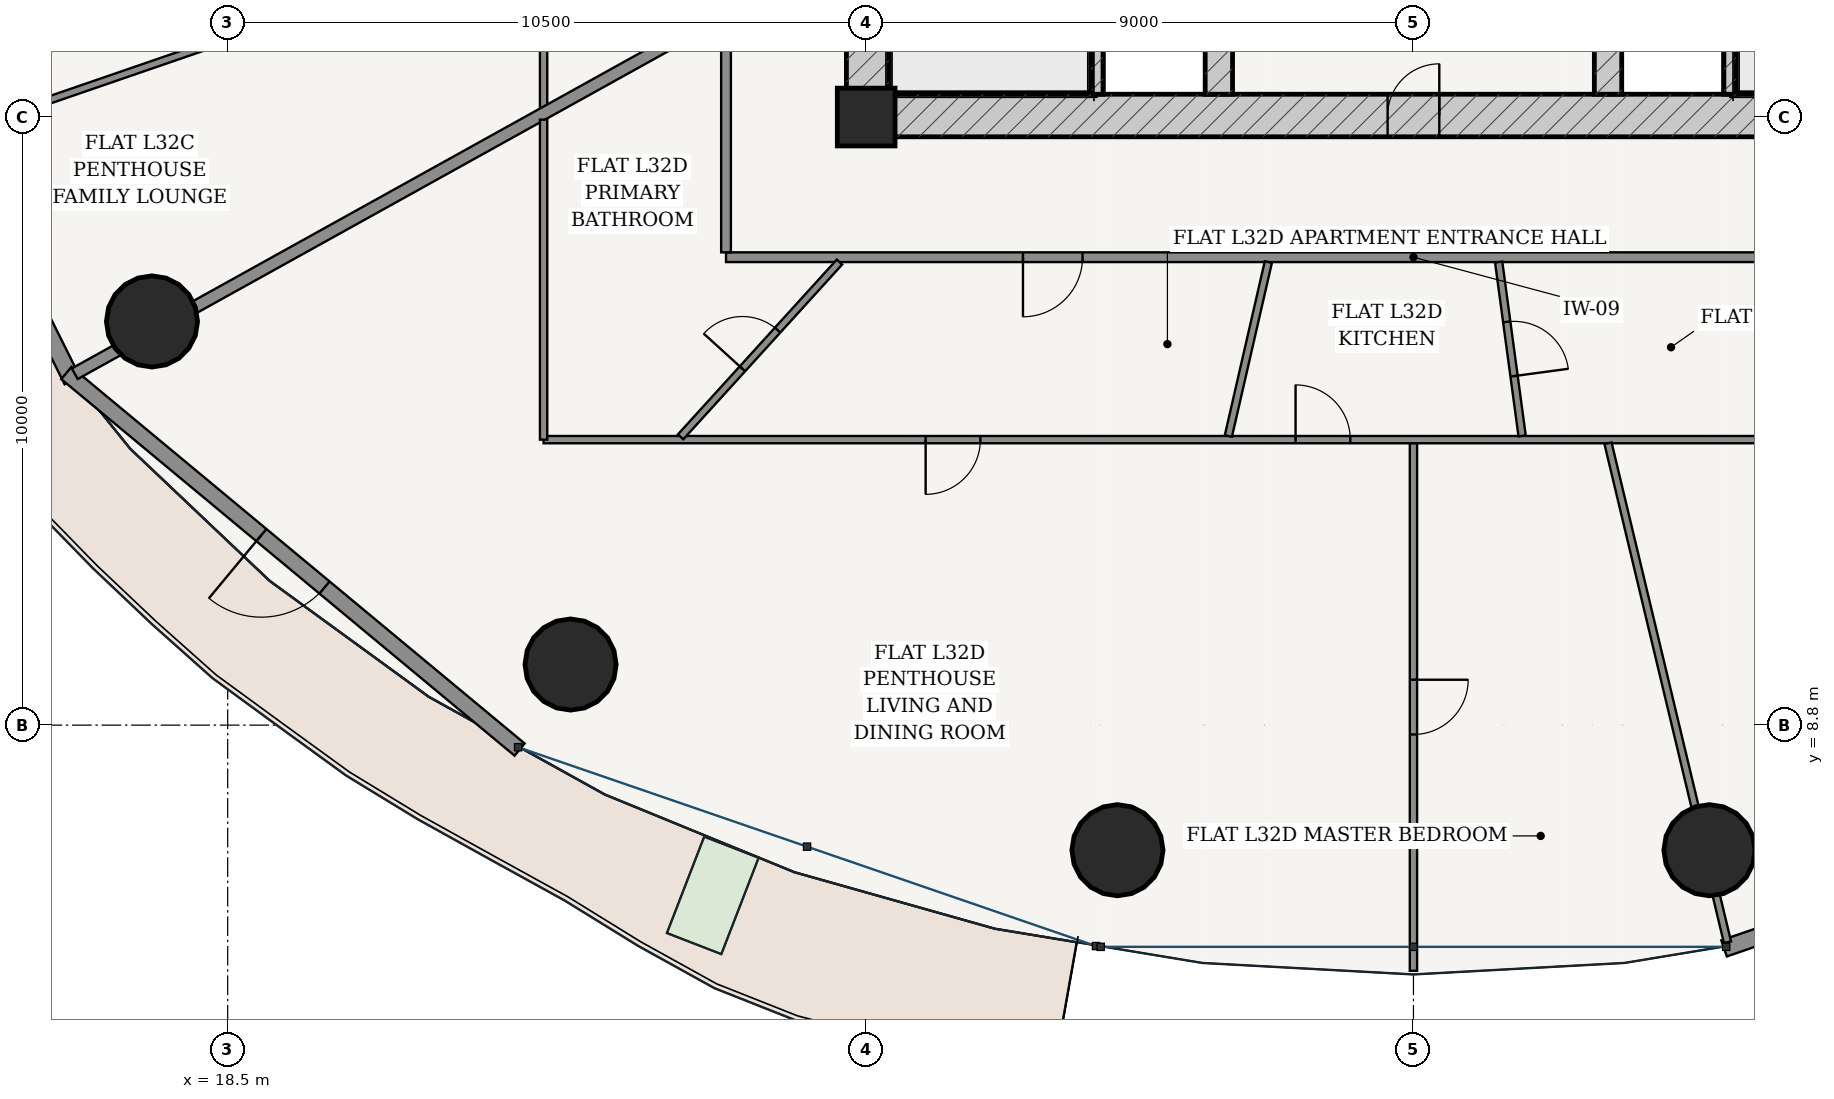
"""IFC4 building model, lengths in metres.
Left out: names, types, materials, properties, quantities, classifications, styles, units other than length and angle.
Written with IfcOpenShell. Run it as: python <this file> out.ifc"""

import sys

from ifc_helpers import new_model, si_unit, direction, frame, frame_2d, origin, origin_2d, place, context, subcontext, project, spatial, rectangle, hollow_circle, extrude, source, transform, mapped, element, fill, save


model = new_model("IFC4")
c1 = context("Model", 3, precision=1e-05, world=origin(), true_north=direction((-0.2419218956, 0.970295726276)))
c2 = subcontext(c1, "Body", "Model", "MODEL_VIEW")
j1 = project(units=[si_unit("LENGTHUNIT", "METRE"), si_unit("PLANEANGLEUNIT", "RADIAN")], contexts=[c1])
p1 = place(None, origin())
s1 = spatial("IfcSite", under=j1, at=p1, CompositionType="ELEMENT")
p2 = place(p1, origin())
s2 = spatial("IfcBuilding", under=s1, at=p2, CompositionType="ELEMENT")
p3 = place(p2, frame((0.0, 0.0, 123.0)))
s3 = spatial("IfcBuildingStorey", under=s2, at=p3, CompositionType="ELEMENT", Elevation=123.0)
p4 = place(p3, frame((29.0, 18.8, 0.0), z_axis=(0.0, 0.0, 1.0), x_axis=(1.0, 0.0, 0.0)))
e1 = element("IfcColumn", 1, at=p4, inside=s3, PredefinedType="COLUMN", context=c2, shape_type="SweptSolid", body=[
    extrude(rectangle(XDim=0.95, YDim=0.95, at=origin_2d()), origin(), (0.0, 0.0, 1.0), 3.6),
])
p5 = place(p3, frame((28.675, 18.825, 0.0), z_axis=(0.0, 0.0, 1.0), x_axis=(1.0, 0.0, 0.0)))
e2 = element("IfcWall", 2, at=p5, inside=s3, PredefinedType="SHEAR", context=c2, shape_type="SweptSolid", body=[
    extrude(rectangle(XDim=18.65, YDim=0.7, at=frame_2d((9.325, 0.0))), origin(), (0.0, 0.0, 1.0), 3.325),
])
p6 = place(p5, frame((8.9, 0.0, 0.0)))
e3 = element("IfcOpeningElement", 3, at=p6, cuts=e2, PredefinedType="OPENING", context=c2, shape_type="SweptSolid", body=[
    extrude(rectangle(XDim=0.85, YDim=2.1, at=frame_2d((0.425, 1.05))), frame((0.0, 0.36, 0.0), z_axis=(0.0, -1.0, 0.0), x_axis=(1.0, 0.0, 0.0)), (0.0, 0.0, 1.0), 0.72),
])
p7 = place(p3, frame((29.025, 19.175, 0.0), z_axis=(0.0, 0.0, 1.0), x_axis=(0.0, 1.0, 0.0)))
e4 = element("IfcWall", 4, at=p7, inside=s3, PredefinedType="SHEAR", context=c2, shape_type="SweptSolid", body=[
    extrude(rectangle(XDim=15.25, YDim=0.7, at=frame_2d((7.625, 0.0))), origin(), (0.0, 0.0, 1.0), 3.325),
])
p8 = place(p7, frame((9.875, 0.0, 0.0)))
e5 = element("IfcOpeningElement", 5, at=p8, cuts=e4, PredefinedType="OPENING", context=c2, shape_type="SweptSolid", body=[
    extrude(rectangle(XDim=1.5, YDim=2.2, at=frame_2d((0.75, 1.1))), frame((0.0, 0.36, 0.0), z_axis=(0.0, -1.0, 0.0), x_axis=(1.0, 0.0, 0.0)), (0.0, 0.0, 1.0), 0.72),
])
for number, where, z_axis, x_axis in (
    (6, (32.795, 19.175, 0.0), (0.0, 0.0, 1.0), (0.0, 1.0, 0.0)),
    (7, (43.205, 19.175, 0.0), (0.0, 0.0, 1.0), (0.0, 1.0, 0.0)),
):
    element("IfcWall", number, at=place(p3, frame(where, z_axis=z_axis, x_axis=x_axis)), inside=s3, PredefinedType="SOLIDWALL", context=c2, shape_type="SweptSolid", body=[
        extrude(rectangle(XDim=7.375, YDim=0.2, at=frame_2d((3.688, 0.0))), origin(), (0.0, 0.0, 1.0), 3.325),
    ])
p9 = place(p3, frame((34.8, 19.175, 0.0), z_axis=(0.0, 0.0, 1.0), x_axis=(0.0, 1.0, 0.0)))
e8 = element("IfcWall", 8, at=p9, inside=s3, PredefinedType="SHEAR", context=c2, shape_type="SweptSolid", body=[
    extrude(rectangle(XDim=15.25, YDim=0.45, at=frame_2d((7.625, 0.0))), origin(), (0.0, 0.0, 1.0), 3.325),
])
p10 = place(p9, frame((7.8, 0.0, 0.0)))
e9 = element("IfcOpeningElement", 9, at=p10, cuts=e8, PredefinedType="OPENING", context=c2, shape_type="SweptSolid", body=[
    extrude(rectangle(XDim=1.05, YDim=2.15, at=frame_2d((0.525, 1.075))), frame((0.0, 0.235, 0.0), z_axis=(0.0, -1.0, 0.0), x_axis=(1.0, 0.0, 0.0)), (0.0, 0.0, 1.0), 0.47),
])
p11 = place(p3, frame((41.2, 19.175, 0.0), z_axis=(0.0, 0.0, 1.0), x_axis=(0.0, 1.0, 0.0)))
e10 = element("IfcWall", 10, at=p11, inside=s3, PredefinedType="SHEAR", context=c2, shape_type="SweptSolid", body=[
    extrude(rectangle(XDim=15.25, YDim=0.45, at=frame_2d((7.625, 0.0))), origin(), (0.0, 0.0, 1.0), 3.325),
])
p12 = place(p11, frame((7.8, 0.0, 0.0)))
e11 = element("IfcOpeningElement", 11, at=p12, cuts=e10, PredefinedType="OPENING", context=c2, shape_type="SweptSolid", body=[
    extrude(rectangle(XDim=1.05, YDim=2.15, at=frame_2d((0.525, 1.075))), frame((0.0, 0.235, 0.0), z_axis=(0.0, -1.0, 0.0), x_axis=(1.0, 0.0, 0.0)), (0.0, 0.0, 1.0), 0.47),
])
for number, where, z_axis, x_axis in (
    (12, (17.255, 15.438, 0.0), (0.0, 0.0, 1.0), (1.0, 0.0, 0.0)),
    (13, (24.138, 9.796, 0.0), (0.0, 0.0, 1.0), (1.0, 0.0, 0.0)),
    (14, (33.133, 6.743, 0.0), (0.0, 0.0, 1.0), (1.0, 0.0, 0.0)),
    (15, (42.867, 6.743, 0.0), (0.0, 0.0, 1.0), (1.0, 0.0, 0.0)),
):
    element("IfcColumn", number, at=place(p3, frame(where, z_axis=z_axis, x_axis=x_axis)), inside=s3, PredefinedType="COLUMN", context=c2, shape_type="SweptSolid", body=[
        extrude(hollow_circle(Radius=0.75, WallThickness=0.045, at=origin_2d()), origin(), (0.0, 0.0, 1.0), 3.6),
    ])
p13 = place(p3, frame((11.905, 22.566, 0.0), z_axis=(0.0, 0.0, 1.0), x_axis=(0.446274562077, -0.894896091869, 0.0)))
e16 = element("IfcWall", 16, at=p13, inside=s3, PredefinedType="SOLIDWALL", context=c2, shape_type="SweptSolid", body=[
    extrude(rectangle(XDim=9.05, YDim=0.28, at=frame_2d((4.525, 0.0))), origin(), (0.0, 0.0, 1.0), 3.325),
])
p14 = place(p13, frame((1.394, 0.0, 0.85)))
e17 = element("IfcOpeningElement", 17, at=p14, cuts=e16, PredefinedType="OPENING", context=c2, shape_type="SweptSolid", body=[
    extrude(rectangle(XDim=2.1, YDim=1.95, at=frame_2d((1.05, 0.975))), frame((0.0, 0.15, 0.0), z_axis=(0.0, -1.0, 0.0), x_axis=(1.0, 0.0, 0.0)), (0.0, 0.0, 1.0), 0.3),
])
p15 = place(p13, frame((5.557, 0.0, 0.85)))
e18 = element("IfcOpeningElement", 18, at=p15, cuts=e16, PredefinedType="OPENING", context=c2, shape_type="SweptSolid", body=[
    extrude(rectangle(XDim=2.1, YDim=1.95, at=frame_2d((1.05, 0.975))), frame((0.0, 0.15, 0.0), z_axis=(0.0, -1.0, 0.0), x_axis=(1.0, 0.0, 0.0)), (0.0, 0.0, 1.0), 0.3),
])
p16 = place(p3, frame((15.846, 14.59, 0.0), z_axis=(0.0, 0.0, 1.0), x_axis=(0.769254958887, -0.638941944333, 0.0)))
e19 = element("IfcWall", 19, at=p16, inside=s3, PredefinedType="SOLIDWALL", context=c2, shape_type="SweptSolid", body=[
    extrude(rectangle(XDim=9.69, YDim=0.26, at=frame_2d((4.845, 0.0))), origin(), (0.0, 0.0, 1.0), 3.325),
])
p17 = place(p16, frame((4.17, 0.0, 0.0)))
e20 = element("IfcOpeningElement", 20, at=p17, cuts=e19, PredefinedType="OPENING", context=c2, shape_type="SweptSolid", body=[
    extrude(rectangle(XDim=1.35, YDim=2.2, at=frame_2d((0.675, 1.1))), frame((0.0, 0.14, 0.0), z_axis=(0.0, -1.0, 0.0), x_axis=(1.0, 0.0, 0.0)), (0.0, 0.0, 1.0), 0.28),
])
p18 = place(p3, frame((43.108, 5.128, 0.0), z_axis=(0.0, 0.0, 1.0), x_axis=(0.945590132341, 0.325360264351, 0.0)))
e21 = element("IfcWall", 21, at=p18, inside=s3, PredefinedType="SOLIDWALL", context=c2, shape_type="SweptSolid", body=[
    extrude(rectangle(XDim=10.289, YDim=0.28, at=frame_2d((5.145, 0.0))), origin(), (0.0, 0.0, 1.0), 3.325),
])
p19 = place(p18, frame((1.728, 0.0, 0.85)))
e22 = element("IfcOpeningElement", 22, at=p19, cuts=e21, PredefinedType="OPENING", context=c2, shape_type="SweptSolid", body=[
    extrude(rectangle(XDim=2.1, YDim=1.95, at=frame_2d((1.05, 0.975))), frame((0.0, 0.15, 0.0), z_axis=(0.0, -1.0, 0.0), x_axis=(1.0, 0.0, 0.0)), (0.0, 0.0, 1.0), 0.3),
])
p20 = place(p18, frame((6.461, 0.0, 0.85)))
e23 = element("IfcOpeningElement", 23, at=p20, cuts=e21, PredefinedType="OPENING", context=c2, shape_type="SweptSolid", body=[
    extrude(rectangle(XDim=2.1, YDim=1.95, at=frame_2d((1.05, 0.975))), frame((0.0, 0.15, 0.0), z_axis=(0.0, -1.0, 0.0), x_axis=(1.0, 0.0, 0.0)), (0.0, 0.0, 1.0), 0.3),
])
p21 = place(p3, frame((26.695, 16.495, 0.0), z_axis=(0.0, 0.0, 1.0), x_axis=(1.0, 0.0, 0.0)))
e24 = element("IfcWall", 24, at=p21, inside=s3, PredefinedType="PARTITIONING", context=c2, shape_type="SweptSolid", body=[
    extrude(rectangle(XDim=22.61, YDim=0.16, at=frame_2d((11.305, 0.0))), origin(), (0.0, 0.0, 1.0), 2.767),
])
p22 = place(p21, frame((4.883, 0.0, 0.0)))
e25 = element("IfcOpeningElement", 25, at=p22, cuts=e24, PredefinedType="OPENING", context=c2, shape_type="SweptSolid", body=[
    extrude(rectangle(XDim=0.98, YDim=2.2, at=frame_2d((0.49, 1.1))), frame((0.0, 0.09, 0.0), z_axis=(0.0, -1.0, 0.0), x_axis=(1.0, 0.0, 0.0)), (0.0, 0.0, 1.0), 0.18),
])
p23 = place(p3, frame((26.695, 16.575, 0.0), z_axis=(0.0, 0.0, 1.0), x_axis=(0.0, 1.0, 0.0)))
e26 = element("IfcWall", 26, at=p23, inside=s3, PredefinedType="PARTITIONING", context=c2, shape_type="SweptSolid", body=[
    extrude(rectangle(XDim=20.45, YDim=0.16, at=frame_2d((10.225, 0.0))), origin(), (0.0, 0.0, 1.0), 2.767),
])
p24 = place(p23, frame((9.547, 0.0, 0.0)))
e27 = element("IfcOpeningElement", 27, at=p24, cuts=e26, PredefinedType="OPENING", context=c2, shape_type="SweptSolid", body=[
    extrude(rectangle(XDim=0.98, YDim=2.2, at=frame_2d((0.49, 1.1))), frame((0.0, 0.09, 0.0), z_axis=(0.0, -1.0, 0.0), x_axis=(1.0, 0.0, 0.0)), (0.0, 0.0, 1.0), 0.18),
])
p25 = place(p3, frame((23.695, 18.961, 0.0), z_axis=(0.0, 0.0, 1.0), x_axis=(0.0, 1.0, 0.0)))
e28 = element("IfcWall", 28, at=p25, inside=s3, PredefinedType="PARTITIONING", context=c2, shape_type="SweptSolid", body=[
    extrude(rectangle(XDim=15.679, YDim=0.12, at=frame_2d((7.839, 0.0))), origin(), (0.0, 0.0, 1.0), 2.767),
])
p26 = place(p25, frame((7.625, 0.0, 0.0)))
e29 = element("IfcOpeningElement", 29, at=p26, cuts=e28, PredefinedType="OPENING", context=c2, shape_type="SweptSolid", body=[
    extrude(rectangle(XDim=0.9, YDim=2.15, at=frame_2d((0.45, 1.075))), frame((0.0, 0.07, 0.0), z_axis=(0.0, -1.0, 0.0), x_axis=(1.0, 0.0, 0.0)), (0.0, 0.0, 1.0), 0.14),
])
p27 = place(p25, frame((1.128, 0.0, 0.0)))
e30 = element("IfcOpeningElement", 30, at=p27, cuts=e28, PredefinedType="OPENING", context=c2, shape_type="SweptSolid", body=[
    extrude(rectangle(XDim=0.9, YDim=2.15, at=frame_2d((0.45, 1.075))), frame((0.0, 0.07, 0.0), z_axis=(0.0, -1.0, 0.0), x_axis=(1.0, 0.0, 0.0)), (0.0, 0.0, 1.0), 0.14),
])
p28 = place(p3, frame((23.636, 21.857, 0.0), z_axis=(0.0, 0.0, 1.0), x_axis=(-0.945571197348, -0.325415289661, 0.0)))
e31 = element("IfcWall", 31, at=p28, inside=s3, PredefinedType="PARTITIONING", context=c2, shape_type="SweptSolid", body=[
    extrude(rectangle(XDim=10.737, YDim=0.12, at=frame_2d((5.368, 0.0))), origin(), (0.0, 0.0, 1.0), 2.767),
])
p29 = place(p28, frame((4.918, 0.0, 0.0)))
e32 = element("IfcOpeningElement", 32, at=p29, cuts=e31, PredefinedType="OPENING", context=c2, shape_type="SweptSolid", body=[
    extrude(rectangle(XDim=0.9, YDim=2.15, at=frame_2d((0.45, 1.075))), frame((0.0, 0.07, 0.0), z_axis=(0.0, -1.0, 0.0), x_axis=(1.0, 0.0, 0.0)), (0.0, 0.0, 1.0), 0.14),
])
p30 = place(p3, frame((26.615, 20.48, 0.0), z_axis=(0.0, 0.0, 1.0), x_axis=(-0.874310671773, -0.48536671623, 0.0)))
e33 = element("IfcWall", 33, at=p30, inside=s3, PredefinedType="PARTITIONING", context=c2, shape_type="SweptSolid", body=[
    extrude(rectangle(XDim=12.159, YDim=0.2, at=frame_2d((6.079, 0.0))), origin(), (0.0, 0.0, 1.0), 2.767),
])
p31 = place(p3, frame((48.598, 13.495, 0.0), z_axis=(0.0, 0.0, 1.0), x_axis=(-1.0, 0.0, 0.0)))
e34 = element("IfcWall", 34, at=p31, inside=s3, PredefinedType="PARTITIONING", context=c2, shape_type="SweptSolid", body=[
    extrude(rectangle(XDim=24.903, YDim=0.12, at=frame_2d((12.452, 0.0))), origin(), (0.0, 0.0, 1.0), 2.767),
])
p32 = place(p31, frame((17.72, 0.0, 0.0)))
e35 = element("IfcOpeningElement", 35, at=p32, cuts=e34, PredefinedType="OPENING", context=c2, shape_type="SweptSolid", body=[
    extrude(rectangle(XDim=0.9, YDim=2.15, at=frame_2d((0.45, 1.075))), frame((0.0, 0.07, 0.0), z_axis=(0.0, -1.0, 0.0), x_axis=(1.0, 0.0, 0.0)), (0.0, 0.0, 1.0), 0.14),
])
p33 = place(p31, frame((11.637, 0.0, 0.0)))
e36 = element("IfcOpeningElement", 36, at=p33, cuts=e34, PredefinedType="OPENING", context=c2, shape_type="SweptSolid", body=[
    extrude(rectangle(XDim=0.9, YDim=2.15, at=frame_2d((0.45, 1.075))), frame((0.0, 0.07, 0.0), z_axis=(0.0, -1.0, 0.0), x_axis=(1.0, 0.0, 0.0)), (0.0, 0.0, 1.0), 0.14),
])
p34 = place(p31, frame((3.376, 0.0, 0.0)))
e37 = element("IfcOpeningElement", 37, at=p34, cuts=e34, PredefinedType="OPENING", context=c2, shape_type="SweptSolid", body=[
    extrude(rectangle(XDim=0.9, YDim=2.15, at=frame_2d((0.45, 1.075))), frame((0.0, 0.07, 0.0), z_axis=(0.0, -1.0, 0.0), x_axis=(1.0, 0.0, 0.0)), (0.0, 0.0, 1.0), 0.14),
])
p35 = place(p3, frame((23.695, 13.495, 0.0), z_axis=(0.0, 0.0, 1.0), x_axis=(0.0, 1.0, 0.0)))
e38 = element("IfcWall", 38, at=p35, inside=s3, PredefinedType="PARTITIONING", context=c2, shape_type="SweptSolid", body=[
    extrude(rectangle(XDim=5.261, YDim=0.12, at=frame_2d((2.631, 0.0))), origin(), (0.0, 0.0, 1.0), 3.004),
])
p36 = place(p3, frame((38.0, 13.433, 0.0), z_axis=(0.0, 0.0, 1.0), x_axis=(0.0, -1.0, 0.0)))
e39 = element("IfcWall", 39, at=p36, inside=s3, PredefinedType="PARTITIONING", context=c2, shape_type="SweptSolid", body=[
    extrude(rectangle(XDim=8.673, YDim=0.12, at=frame_2d((4.336, 0.0))), origin(), (0.0, 0.0, 1.0), 2.767),
])
p37 = place(p36, frame((3.886, 0.0, 0.0)))
e40 = element("IfcOpeningElement", 40, at=p37, cuts=e39, PredefinedType="OPENING", context=c2, shape_type="SweptSolid", body=[
    extrude(rectangle(XDim=0.9, YDim=2.15, at=frame_2d((0.45, 1.075))), frame((0.0, 0.07, 0.0), z_axis=(0.0, -1.0, 0.0), x_axis=(1.0, 0.0, 0.0)), (0.0, 0.0, 1.0), 0.14),
])
p38 = place(p3, frame((41.2, 13.435, 0.0), z_axis=(0.0, 0.0, 1.0), x_axis=(0.232814779051, -0.972521094196, 0.0)))
e41 = element("IfcWall", 41, at=p38, inside=s3, PredefinedType="PARTITIONING", context=c2, shape_type="SweptSolid", body=[
    extrude(rectangle(XDim=8.438, YDim=0.12, at=frame_2d((4.219, 0.0))), origin(), (0.0, 0.0, 1.0), 2.767),
])
p39 = place(p3, frame((28.561, 16.415, 0.0), z_axis=(0.0, 0.0, 1.0), x_axis=(-0.672578928456, -0.740025394833, 0.0)))
e42 = element("IfcWall", 42, at=p39, inside=s3, PredefinedType="PARTITIONING", context=c2, shape_type="SweptSolid", body=[
    extrude(rectangle(XDim=3.884, YDim=0.12, at=frame_2d((1.942, 0.0))), origin(), (0.0, 0.0, 1.0), 2.767),
])
p40 = place(p39, frame((1.512, 0.0, 0.0)))
e43 = element("IfcOpeningElement", 43, at=p40, cuts=e42, PredefinedType="OPENING", context=c2, shape_type="SweptSolid", body=[
    extrude(rectangle(XDim=0.86, YDim=2.15, at=frame_2d((0.43, 1.075))), frame((0.0, 0.07, 0.0), z_axis=(0.0, -1.0, 0.0), x_axis=(1.0, 0.0, 0.0)), (0.0, 0.0, 1.0), 0.14),
])
p41 = place(p3, frame((35.614, 16.415, 0.0), z_axis=(0.0, 0.0, 1.0), x_axis=(-0.223911395669, -0.974609504822, 0.0)))
e44 = element("IfcWall", 44, at=p41, inside=s3, PredefinedType="PARTITIONING", context=c2, shape_type="SweptSolid", body=[
    extrude(rectangle(XDim=2.934, YDim=0.12, at=frame_2d((1.467, 0.0))), origin(), (0.0, 0.0, 1.0), 2.767),
])
p42 = place(p3, frame((39.401, 16.415, 0.0), z_axis=(0.0, 0.0, 1.0), x_axis=(0.133726943496, -0.99101821607, 0.0)))
e45 = element("IfcWall", 45, at=p42, inside=s3, PredefinedType="PARTITIONING", context=c2, shape_type="SweptSolid", body=[
    extrude(rectangle(XDim=2.885, YDim=0.12, at=frame_2d((1.442, 0.0))), origin(), (0.0, 0.0, 1.0), 3.325),
])
p43 = place(p42, frame((0.992, 0.0, 0.0)))
e46 = element("IfcOpeningElement", 46, at=p43, cuts=e45, PredefinedType="OPENING", context=c2, shape_type="SweptSolid", body=[
    extrude(rectangle(XDim=0.9, YDim=2.15, at=frame_2d((0.45, 1.075))), frame((0.0, 0.07, 0.0), z_axis=(0.0, -1.0, 0.0), x_axis=(1.0, 0.0, 0.0)), (0.0, 0.0, 1.0), 0.14),
])
m1 = source(origin(), c2, "Body", "SweptSolid", [
    extrude(rectangle(XDim=1.35, YDim=2.2, at=frame_2d((0.675, 1.1))), frame((0.0, 0.025, 0.0), z_axis=(0.0, -1.0, 0.0), x_axis=(1.0, 0.0, 0.0)), (0.0, 0.0, 1.0), 0.05),
])
p44 = place(p17, frame((1.35, 0.0, 0.0), z_axis=(0.0, 0.0, 1.0), x_axis=(-1.0, 0.0, 0.0)))
e47 = element("IfcDoor", 47, at=p44, inside=s3, OperationType="SINGLE_SWING_RIGHT", PredefinedType="DOOR", context=c2, shape_type="MappedRepresentation", body=[
    mapped(m1, transform((0.0, 0.0, 0.0), scale=1.0)),
])
fill(e20, e47)
m2 = source(origin(), c2, "Body", "SweptSolid", [
    extrude(rectangle(XDim=0.85, YDim=2.1, at=frame_2d((0.425, 1.05))), frame((0.0, 0.025, 0.0), z_axis=(0.0, -1.0, 0.0), x_axis=(1.0, 0.0, 0.0)), (0.0, 0.0, 1.0), 0.05),
])
p45 = place(p6, origin())
e48 = element("IfcDoor", 48, at=p45, inside=s3, OperationType="SINGLE_SWING_RIGHT", PredefinedType="DOOR", context=c2, shape_type="MappedRepresentation", body=[
    mapped(m2, transform((0.0, 0.0, 0.0), scale=1.0)),
])
fill(e3, e48)
m3 = source(origin(), c2, "Body", "SweptSolid", [
    extrude(rectangle(XDim=0.98, YDim=2.2, at=frame_2d((0.49, 1.1))), frame((0.0, 0.025, 0.0), z_axis=(0.0, -1.0, 0.0), x_axis=(1.0, 0.0, 0.0)), (0.0, 0.0, 1.0), 0.05),
])
p46 = place(p22, frame((0.98, 0.0, 0.0), z_axis=(0.0, 0.0, 1.0), x_axis=(-1.0, 0.0, 0.0)))
e49 = element("IfcDoor", 49, at=p46, inside=s3, OperationType="SINGLE_SWING_RIGHT", PredefinedType="DOOR", context=c2, shape_type="MappedRepresentation", body=[
    mapped(m3, transform((0.0, 0.0, 0.0), scale=1.0)),
])
fill(e25, e49)
m4 = source(origin(), c2, "Body", "SweptSolid", [
    extrude(rectangle(XDim=0.86, YDim=2.15, at=frame_2d((0.43, 1.075))), frame((0.0, 0.025, 0.0), z_axis=(0.0, -1.0, 0.0), x_axis=(1.0, 0.0, 0.0)), (0.0, 0.0, 1.0), 0.05),
])
p47 = place(p40, frame((0.86, 0.0, 0.0), z_axis=(0.0, 0.0, 1.0), x_axis=(-1.0, 0.0, 0.0)))
e50 = element("IfcDoor", 50, at=p47, inside=s3, OperationType="SINGLE_SWING_LEFT", PredefinedType="DOOR", context=c2, shape_type="MappedRepresentation", body=[
    mapped(m4, transform((0.0, 0.0, 0.0), scale=1.0)),
])
fill(e43, e50)
m5 = source(origin(), c2, "Body", "SweptSolid", [
    extrude(rectangle(XDim=0.9, YDim=2.15, at=frame_2d((0.45, 1.075))), frame((0.0, 0.025, 0.0), z_axis=(0.0, -1.0, 0.0), x_axis=(1.0, 0.0, 0.0)), (0.0, 0.0, 1.0), 0.05),
])
p48 = place(p32, origin())
e51 = element("IfcDoor", 51, at=p48, inside=s3, OperationType="SINGLE_SWING_RIGHT", PredefinedType="DOOR", context=c2, shape_type="MappedRepresentation", body=[
    mapped(m5, transform((0.0, 0.0, 0.0), scale=1.0)),
])
fill(e35, e51)
p49 = place(p33, frame((0.9, 0.0, 0.0), z_axis=(0.0, 0.0, 1.0), x_axis=(-1.0, 0.0, 0.0)))
e52 = element("IfcDoor", 52, at=p49, inside=s3, OperationType="SINGLE_SWING_LEFT", PredefinedType="DOOR", context=c2, shape_type="MappedRepresentation", body=[
    mapped(m5, transform((0.0, 0.0, 0.0), scale=1.0)),
])
fill(e36, e52)
p50 = place(p43, origin())
e53 = element("IfcDoor", 53, at=p50, inside=s3, OperationType="SINGLE_SWING_RIGHT", PredefinedType="DOOR", context=c2, shape_type="MappedRepresentation", body=[
    mapped(m5, transform((0.0, 0.0, 0.0), scale=1.0)),
])
fill(e46, e53)
p51 = place(p37, origin())
e54 = element("IfcDoor", 54, at=p51, inside=s3, OperationType="SINGLE_SWING_LEFT", PredefinedType="DOOR", context=c2, shape_type="MappedRepresentation", body=[
    mapped(m5, transform((0.0, 0.0, 0.0), scale=1.0)),
])
fill(e40, e54)
save(model, sys.argv[1])
